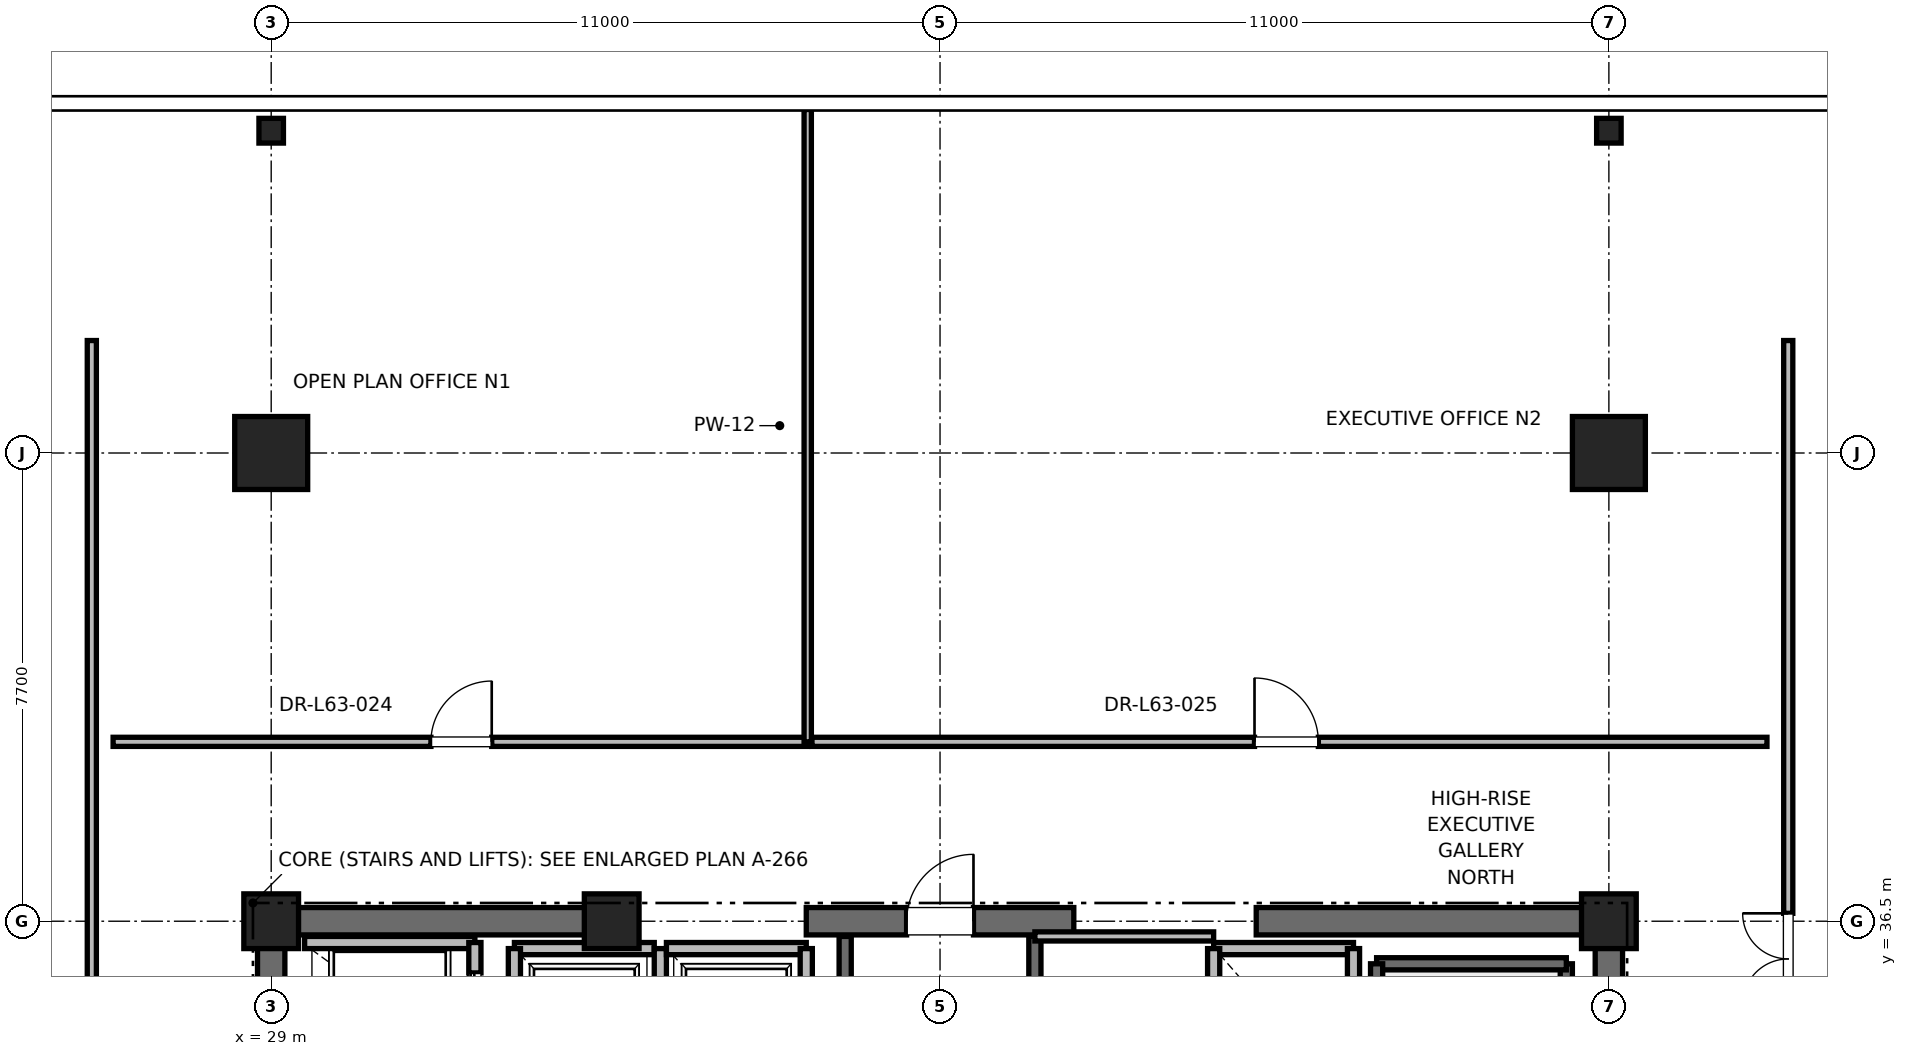
"""IFC4 building model, lengths in metres.
Left out: names, types, materials, properties, quantities, classifications, styles, units other than length and angle.
Written with IfcOpenShell. Run it as: python <this file> out.ifc"""

import sys

from ifc_helpers import new_model, si_unit, direction, frame, frame_2d, origin, origin_2d, place, context, subcontext, project, spatial, rectangle, i_section, extrude, element, fill, save


model = new_model("IFC4")
c1 = context("Model", 3, precision=1e-05, world=origin(), true_north=direction((0.0, 1.0)))
c2 = subcontext(c1, "Body", "Model", "MODEL_VIEW")
j1 = project(units=[si_unit("LENGTHUNIT", "METRE"), si_unit("PLANEANGLEUNIT", "RADIAN")], contexts=[c1])
p1 = place(None, origin())
s1 = spatial("IfcSite", under=j1, at=p1, CompositionType="ELEMENT")
p2 = place(p1, origin())
s2 = spatial("IfcBuilding", under=s1, at=p2, CompositionType="ELEMENT")
p3 = place(p2, frame((0.0, 0.0, 271.2)))
s3 = spatial("IfcBuildingStorey", under=s2, at=p3, CompositionType="ELEMENT", Elevation=271.2)
for number, where, z_axis, x_axis in (
    (1, (29.0, 44.2, 0.0), (0.0, 0.0, 1.0), (1.0, 0.0, 0.0)),
    (2, (51.0, 44.2, 0.0), (0.0, 0.0, 1.0), (1.0, 0.0, 0.0)),
):
    element("IfcColumn", number, at=place(p3, frame(where, z_axis=z_axis, x_axis=x_axis)), inside=s3, PredefinedType="COLUMN", context=c2, shape_type="SweptSolid", body=[
        extrude(rectangle(XDim=1.2, YDim=1.2, at=origin_2d()), origin(), (0.0, 0.0, 1.0), 4.0),
    ])
for number, where, z_axis, x_axis in (
    (3, (29.0, 49.5, 0.0), (0.0, 0.0, 1.0), (1.0, 0.0, 0.0)),
    (4, (51.0, 49.5, 0.0), (0.0, 0.0, 1.0), (1.0, 0.0, 0.0)),
):
    element("IfcColumn", number, at=place(p3, frame(where, z_axis=z_axis, x_axis=x_axis)), inside=s3, PredefinedType="COLUMN", context=c2, shape_type="SweptSolid", body=[
        extrude(i_section(OverallWidth=0.403, OverallDepth=0.406, WebThickness=0.027, FlangeThickness=0.043, FilletRadius=0.015, at=origin_2d()), origin(), (0.0, 0.0, 1.0), 4.0),
    ])
for number, where, z_axis, x_axis in (
    (5, (29.0, 36.5, 0.0), (0.0, 0.0, 1.0), (1.0, 0.0, 0.0)),
    (6, (51.0, 36.5, 0.0), (0.0, 0.0, 1.0), (1.0, 0.0, 0.0)),
    (7, (34.6, 36.5, 0.0), (0.0, 0.0, 1.0), (1.0, 0.0, 0.0)),
):
    element("IfcColumn", number, at=place(p3, frame(where, z_axis=z_axis, x_axis=x_axis)), inside=s3, PredefinedType="PILASTER", context=c2, shape_type="SweptSolid", body=[
        extrude(rectangle(XDim=0.9, YDim=0.9, at=origin_2d()), origin(), (0.0, 0.0, 1.0), 4.0),
    ])
p4 = place(p3, frame((29.0, 36.5, 0.0), z_axis=(0.0, 0.0, 1.0), x_axis=(1.0, 0.0, 0.0)))
e8 = element("IfcWall", 8, at=p4, inside=s3, PredefinedType="SHEAR", context=c2, shape_type="SweptSolid", body=[
    extrude(rectangle(XDim=5.8, YDim=0.45, at=frame_2d((2.9, 0.0))), origin(), (0.0, 0.0, 1.0), 3.785),
])
p5 = place(p3, frame((37.8, 36.5, 0.0), z_axis=(0.0, 0.0, 1.0), x_axis=(1.0, 0.0, 0.0)))
e9 = element("IfcWall", 9, at=p5, inside=s3, PredefinedType="SHEAR", context=c2, shape_type="SweptSolid", body=[
    extrude(rectangle(XDim=4.4, YDim=0.45, at=frame_2d((2.2, 0.0))), origin(), (0.0, 0.0, 1.0), 3.785),
])
p6 = place(p5, frame((1.65, 0.0, 0.0)))
e10 = element("IfcOpeningElement", 10, at=p6, cuts=e9, PredefinedType="OPENING", context=c2, shape_type="SweptSolid", body=[
    extrude(rectangle(XDim=1.1, YDim=2.15, at=frame_2d((0.55, 1.075))), frame((0.0, 0.225, 0.0), z_axis=(0.0, -1.0, 0.0), x_axis=(1.0, 0.0, 0.0)), (0.0, 0.0, 1.0), 0.45),
])
for number, where, z_axis, x_axis in (
    (11, (45.2, 36.5, 0.0), (0.0, 0.0, 1.0), (1.0, 0.0, 0.0)),
    (12, (29.0, 30.7, 0.0), (0.0, 0.0, 1.0), (0.0, 1.0, 0.0)),
):
    element("IfcWall", number, at=place(p3, frame(where, z_axis=z_axis, x_axis=x_axis)), inside=s3, PredefinedType="SHEAR", context=c2, shape_type="SweptSolid", body=[
        extrude(rectangle(XDim=5.8, YDim=0.45, at=frame_2d((2.9, 0.0))), origin(), (0.0, 0.0, 1.0), 3.785),
    ])
p7 = place(p3, frame((51.0, 27.7, 0.0), z_axis=(0.0, 0.0, 1.0), x_axis=(0.0, 1.0, 0.0)))
e13 = element("IfcWall", 13, at=p7, inside=s3, PredefinedType="SHEAR", context=c2, shape_type="SweptSolid", body=[
    extrude(rectangle(XDim=8.8, YDim=0.45, at=frame_2d((4.4, 0.0))), origin(), (0.0, 0.0, 1.0), 3.785),
])
p8 = place(p3, frame((50.3, 27.65, 0.0), z_axis=(0.0, 0.0, 1.0), x_axis=(0.0, 1.0, 0.0)))
e14 = element("IfcWall", 14, at=p8, inside=s3, PredefinedType="SOLIDWALL", context=c2, shape_type="SweptSolid", body=[
    extrude(rectangle(XDim=8.15, YDim=0.2, at=frame_2d((4.075, 0.0))), origin(), (0.0, 0.0, 1.0), 3.785),
])
p9 = place(p3, frame((47.18, 35.8, 0.0), z_axis=(0.0, 0.0, 1.0), x_axis=(1.0, 0.0, 0.0)))
e15 = element("IfcWall", 15, at=p9, inside=s3, PredefinedType="SOLIDWALL", context=c2, shape_type="SweptSolid", body=[
    extrude(rectangle(XDim=3.12, YDim=0.2, at=frame_2d((1.56, 0.0))), origin(), (0.0, 0.0, 1.0), 3.785),
])
p10 = place(p3, frame((47.18, 27.62, 0.0), z_axis=(0.0, 0.0, 1.0), x_axis=(0.0, 1.0, 0.0)))
e16 = element("IfcWall", 16, at=p10, inside=s3, PredefinedType="SOLIDWALL", context=c2, shape_type="SweptSolid", body=[
    extrude(rectangle(XDim=8.18, YDim=0.2, at=frame_2d((4.09, 0.0))), origin(), (0.0, 0.0, 1.0), 3.785),
])
p11 = place(p3, frame((38.44, 27.38, 0.0), z_axis=(0.0, 0.0, 1.0), x_axis=(0.0, 1.0, 0.0)))
e17 = element("IfcWall", 17, at=p11, inside=s3, PredefinedType="SOLIDWALL", context=c2, shape_type="SweptSolid", body=[
    extrude(rectangle(XDim=8.87, YDim=0.2, at=frame_2d((4.435, 0.0))), origin(), (0.0, 0.0, 1.0), 3.785),
])
p12 = place(p3, frame((41.56, 27.68, 0.0), z_axis=(0.0, 0.0, 1.0), x_axis=(0.0, 1.0, 0.0)))
e18 = element("IfcWall", 18, at=p12, inside=s3, PredefinedType="SOLIDWALL", context=c2, shape_type="SweptSolid", body=[
    extrude(rectangle(XDim=8.57, YDim=0.2, at=frame_2d((4.285, 0.0))), origin(), (0.0, 0.0, 1.0), 3.785),
])
p13 = place(p3, frame((32.35, 36.15, 0.0), z_axis=(0.0, 0.0, 1.0), x_axis=(-1.0, 0.0, 0.0)))
e19 = element("IfcWall", 19, at=p13, inside=s3, PredefinedType="SOLIDWALL", context=c2, shape_type="SweptSolid", body=[
    extrude(rectangle(XDim=2.8, YDim=0.2, at=frame_2d((1.4, 0.0))), origin(), (0.0, 0.0, 1.0), 3.148),
])
p14 = place(p3, frame((32.35, 34.05, 0.0), z_axis=(0.0, 0.0, 1.0), x_axis=(0.0, 1.0, 0.0)))
e20 = element("IfcWall", 20, at=p14, inside=s3, PredefinedType="SOLIDWALL", context=c2, shape_type="SweptSolid", body=[
    extrude(rectangle(XDim=2.1, YDim=0.2, at=frame_2d((1.05, 0.0))), origin(), (0.0, 0.0, 1.0), 3.785),
])
p15 = place(p14, frame((0.5, 0.0, 0.0)))
e21 = element("IfcOpeningElement", 21, at=p15, cuts=e20, PredefinedType="OPENING", context=c2, shape_type="SweptSolid", body=[
    extrude(rectangle(XDim=1.1, YDim=2.2, at=frame_2d((0.55, 1.1))), frame((0.0, 0.1, 0.0), z_axis=(0.0, -1.0, 0.0), x_axis=(1.0, 0.0, 0.0)), (0.0, 0.0, 1.0), 0.2),
])
p16 = place(p3, frame((35.3, 36.05, 0.0), z_axis=(0.0, 0.0, 1.0), x_axis=(-1.0, 0.0, 0.0)))
e22 = element("IfcWall", 22, at=p16, inside=s3, PredefinedType="SOLIDWALL", context=c2, shape_type="SweptSolid", body=[
    extrude(rectangle(XDim=2.3, YDim=0.2, at=frame_2d((1.15, 0.0))), origin(), (0.0, 0.0, 1.0), 2.865),
])
p17 = place(p3, frame((33.0, 36.05, 0.0), z_axis=(0.0, 0.0, 1.0), x_axis=(0.0, -1.0, 0.0)))
e23 = element("IfcWall", 23, at=p17, inside=s3, PredefinedType="SOLIDWALL", context=c2, shape_type="SweptSolid", body=[
    extrude(rectangle(XDim=2.6, YDim=0.2, at=frame_2d((1.3, 0.0))), origin(), (0.0, 0.0, 1.0), 3.785),
])
p18 = place(p3, frame((35.4, 33.45, 0.0), z_axis=(0.0, 0.0, 1.0), x_axis=(0.0, 1.0, 0.0)))
e24 = element("IfcWall", 24, at=p18, inside=s3, PredefinedType="SOLIDWALL", context=c2, shape_type="SweptSolid", body=[
    extrude(rectangle(XDim=2.6, YDim=0.2, at=frame_2d((1.3, 0.0))), origin(), (0.0, 0.0, 1.0), 2.865),
])
p19 = place(p3, frame((37.8, 36.05, 0.0), z_axis=(0.0, 0.0, 1.0), x_axis=(-1.0, 0.0, 0.0)))
e25 = element("IfcWall", 25, at=p19, inside=s3, PredefinedType="SOLIDWALL", context=c2, shape_type="SweptSolid", body=[
    extrude(rectangle(XDim=2.3, YDim=0.2, at=frame_2d((1.15, 0.0))), origin(), (0.0, 0.0, 1.0), 2.865),
])
p20 = place(p3, frame((37.8, 33.45, 0.0), z_axis=(0.0, 0.0, 1.0), x_axis=(0.0, 1.0, 0.0)))
e26 = element("IfcWall", 26, at=p20, inside=s3, PredefinedType="SOLIDWALL", context=c2, shape_type="SweptSolid", body=[
    extrude(rectangle(XDim=2.6, YDim=0.2, at=frame_2d((1.3, 0.0))), origin(), (0.0, 0.0, 1.0), 2.865),
])
p21 = place(p3, frame((46.8, 36.05, 0.0), z_axis=(0.0, 0.0, 1.0), x_axis=(-1.0, 0.0, 0.0)))
e27 = element("IfcWall", 27, at=p21, inside=s3, PredefinedType="SOLIDWALL", context=c2, shape_type="SweptSolid", body=[
    extrude(rectangle(XDim=2.3, YDim=0.2, at=frame_2d((1.15, 0.0))), origin(), (0.0, 0.0, 1.0), 2.865),
])
p22 = place(p3, frame((44.5, 36.05, 0.0), z_axis=(0.0, 0.0, 1.0), x_axis=(0.0, -1.0, 0.0)))
e28 = element("IfcWall", 28, at=p22, inside=s3, PredefinedType="SOLIDWALL", context=c2, shape_type="SweptSolid", body=[
    extrude(rectangle(XDim=2.6, YDim=0.2, at=frame_2d((1.3, 0.0))), origin(), (0.0, 0.0, 1.0), 2.865),
])
p23 = place(p3, frame((46.8, 33.45, 0.0), z_axis=(0.0, 0.0, 1.0), x_axis=(0.0, 1.0, 0.0)))
e29 = element("IfcWall", 29, at=p23, inside=s3, PredefinedType="SOLIDWALL", context=c2, shape_type="SweptSolid", body=[
    extrude(rectangle(XDim=2.6, YDim=0.2, at=frame_2d((1.3, 0.0))), origin(), (0.0, 0.0, 1.0), 3.785),
])
p24 = place(p3, frame((41.56, 36.25, 0.0), z_axis=(0.0, 0.0, 1.0), x_axis=(1.0, 0.0, 0.0)))
e30 = element("IfcWall", 30, at=p24, inside=s3, PredefinedType="PARTITIONING", context=c2, shape_type="SweptSolid", body=[
    extrude(rectangle(XDim=2.94, YDim=0.15, at=frame_2d((1.47, 0.0))), origin(), (0.0, 0.0, 1.0), 2.85),
])
p25 = place(p3, frame((26.4, 39.45, 0.0), z_axis=(0.0, 0.0, 1.0), x_axis=(1.0, 0.0, 0.0)))
e31 = element("IfcWall", 31, at=p25, inside=s3, PredefinedType="PARTITIONING", context=c2, shape_type="SweptSolid", body=[
    extrude(rectangle(XDim=11.424, YDim=0.15, at=frame_2d((5.712, 0.0))), origin(), (0.0, 0.0, 1.0), 2.85),
])
p26 = place(p25, frame((5.227, 0.0, 0.0)))
e32 = element("IfcOpeningElement", 32, at=p26, cuts=e31, PredefinedType="OPENING", context=c2, shape_type="SweptSolid", body=[
    extrude(rectangle(XDim=1.0, YDim=2.15, at=frame_2d((0.5, 1.075))), frame((0.0, 0.075, 0.0), z_axis=(0.0, -1.0, 0.0), x_axis=(1.0, 0.0, 0.0)), (0.0, 0.0, 1.0), 0.15),
])
p27 = place(p3, frame((37.824, 39.45, 0.0), z_axis=(0.0, 0.0, 1.0), x_axis=(0.0, 1.0, 0.0)))
e33 = element("IfcWall", 33, at=p27, inside=s3, PredefinedType="PARTITIONING", context=c2, shape_type="SweptSolid", body=[
    extrude(rectangle(XDim=10.4, YDim=0.12, at=frame_2d((5.2, 0.0))), origin(), (0.0, 0.0, 1.0), 2.415),
])
p28 = place(p3, frame((37.894, 39.45, 0.0), z_axis=(0.0, 0.0, 1.0), x_axis=(1.0, 0.0, 0.0)))
e34 = element("IfcWall", 34, at=p28, inside=s3, PredefinedType="PARTITIONING", context=c2, shape_type="SweptSolid", body=[
    extrude(rectangle(XDim=15.706, YDim=0.15, at=frame_2d((7.853, 0.0))), origin(), (0.0, 0.0, 1.0), 2.85),
])
p29 = place(p28, frame((7.278, 0.0, 0.0)))
e35 = element("IfcOpeningElement", 35, at=p29, cuts=e34, PredefinedType="OPENING", context=c2, shape_type="SweptSolid", body=[
    extrude(rectangle(XDim=1.05, YDim=2.2, at=frame_2d((0.525, 1.1))), frame((0.0, 0.075, 0.0), z_axis=(0.0, -1.0, 0.0), x_axis=(1.0, 0.0, 0.0)), (0.0, 0.0, 1.0), 0.15),
])
p30 = place(p3, frame((26.05, 33.506, 0.0), z_axis=(0.0, 0.0, 1.0), x_axis=(0.0, 1.0, 0.0)))
e36 = element("IfcWall", 36, at=p30, inside=s3, PredefinedType="PARTITIONING", context=c2, shape_type="SweptSolid", body=[
    extrude(rectangle(XDim=12.544, YDim=0.15, at=frame_2d((6.272, 0.0))), origin(), (0.0, 0.0, 1.0), 2.85),
])
p31 = place(p30, frame((0.947, 0.0, 0.0)))
e37 = element("IfcOpeningElement", 37, at=p31, cuts=e36, PredefinedType="OPENING", context=c2, shape_type="SweptSolid", body=[
    extrude(rectangle(XDim=1.0, YDim=2.15, at=frame_2d((0.5, 1.075))), frame((0.0, 0.075, 0.0), z_axis=(0.0, -1.0, 0.0), x_axis=(1.0, 0.0, 0.0)), (0.0, 0.0, 1.0), 0.15),
])
p32 = place(p3, frame((53.95, 34.99, 0.0), z_axis=(0.0, 0.0, 1.0), x_axis=(0.0, 1.0, 0.0)))
e38 = element("IfcWall", 38, at=p32, inside=s3, PredefinedType="PARTITIONING", context=c2, shape_type="SweptSolid", body=[
    extrude(rectangle(XDim=11.06, YDim=0.15, at=frame_2d((5.53, 0.0))), origin(), (0.0, 0.0, 1.0), 2.85),
])
p33 = place(p32, frame((0.14, 0.0, 0.0)))
e39 = element("IfcOpeningElement", 39, at=p33, cuts=e38, PredefinedType="OPENING", context=c2, shape_type="SweptSolid", body=[
    extrude(rectangle(XDim=1.5, YDim=2.25, at=frame_2d((0.75, 1.125))), frame((0.0, 0.075, 0.0), z_axis=(0.0, -1.0, 0.0), x_axis=(1.0, 0.0, 0.0)), (0.0, 0.0, 1.0), 0.15),
])
p34 = place(p6, origin())
e40 = element("IfcDoor", 40, at=p34, inside=s3, OperationType="SINGLE_SWING_RIGHT", PredefinedType="DOOR", context=c2, shape_type="SweptSolid", body=[
    extrude(rectangle(XDim=1.1, YDim=2.15, at=frame_2d((0.55, 1.075))), frame((0.0, 0.025, 0.0), z_axis=(0.0, -1.0, 0.0), x_axis=(1.0, 0.0, 0.0)), (0.0, 0.0, 1.0), 0.05),
])
fill(e10, e40)
p35 = place(p15, origin())
e41 = element("IfcDoor", 41, at=p35, inside=s3, OperationType="SLIDING_TO_RIGHT", PredefinedType="DOOR", context=c2, shape_type="SweptSolid", body=[
    extrude(rectangle(XDim=1.1, YDim=2.2, at=frame_2d((0.55, 1.1))), frame((0.0, 0.025, 0.0), z_axis=(0.0, -1.0, 0.0), x_axis=(1.0, 0.0, 0.0)), (0.0, 0.0, 1.0), 0.05),
])
fill(e21, e41)
p36 = place(p26, origin())
e42 = element("IfcDoor", 42, at=p36, inside=s3, OperationType="SINGLE_SWING_RIGHT", PredefinedType="DOOR", context=c2, shape_type="SweptSolid", body=[
    extrude(rectangle(XDim=1.0, YDim=2.15, at=frame_2d((0.5, 1.075))), frame((0.0, 0.025, 0.0), z_axis=(0.0, -1.0, 0.0), x_axis=(1.0, 0.0, 0.0)), (0.0, 0.0, 1.0), 0.05),
])
fill(e32, e42)
p37 = place(p29, origin())
e43 = element("IfcDoor", 43, at=p37, inside=s3, OperationType="SINGLE_SWING_LEFT", PredefinedType="DOOR", context=c2, shape_type="SweptSolid", body=[
    extrude(rectangle(XDim=1.05, YDim=2.2, at=frame_2d((0.525, 1.1))), frame((0.0, 0.025, 0.0), z_axis=(0.0, -1.0, 0.0), x_axis=(1.0, 0.0, 0.0)), (0.0, 0.0, 1.0), 0.05),
])
fill(e35, e43)
p38 = place(p33, origin())
e44 = element("IfcDoor", 44, at=p38, inside=s3, OperationType="DOUBLE_DOOR_SINGLE_SWING", PredefinedType="DOOR", context=c2, shape_type="SweptSolid", body=[
    extrude(rectangle(XDim=1.5, YDim=2.25, at=frame_2d((0.75, 1.125))), frame((0.0, 0.025, 0.0), z_axis=(0.0, -1.0, 0.0), x_axis=(1.0, 0.0, 0.0)), (0.0, 0.0, 1.0), 0.05),
])
fill(e39, e44)
save(model, sys.argv[1])
